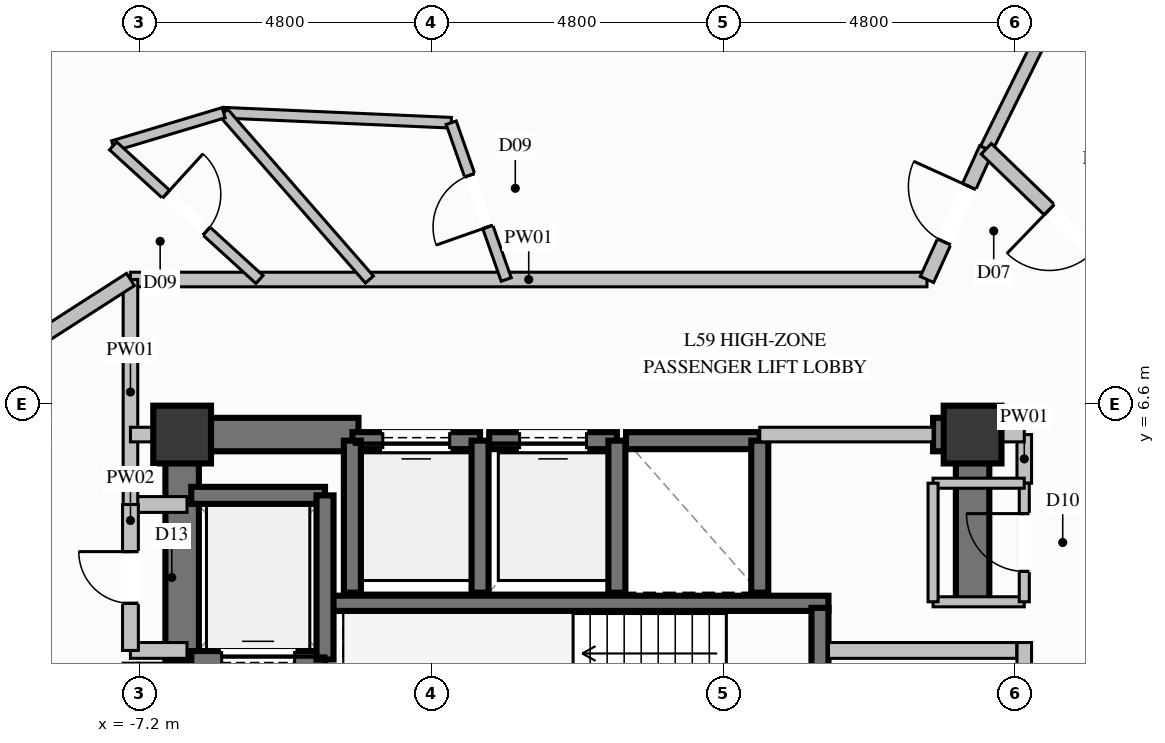
"""IFC4 building model, lengths in metres.
Left out: names, types, materials, properties, quantities, classifications, styles, units other than length and angle.
Written with IfcOpenShell. Run it as: python <this file> out.ifc"""

import sys

from ifc_helpers import new_model, si_unit, direction, frame, frame_2d, origin, origin_2d, place, context, subcontext, project, spatial, rectangle, extrude, element, fill, save


model = new_model("IFC4")
c1 = context("Model", 3, precision=1e-05, world=origin(), true_north=direction((0.0, 1.0)))
c2 = subcontext(c1, "Body", "Model", "MODEL_VIEW")
j1 = project(units=[si_unit("LENGTHUNIT", "METRE"), si_unit("PLANEANGLEUNIT", "RADIAN")], contexts=[c1])
p1 = place(None, origin())
s1 = spatial("IfcSite", under=j1, at=p1, CompositionType="ELEMENT")
p2 = place(p1, origin())
s2 = spatial("IfcBuilding", under=s1, at=p2, CompositionType="ELEMENT")
p3 = place(p2, frame((0.0, 0.0, 227.2)))
s3 = spatial("IfcBuildingStorey", under=s2, at=p3, CompositionType="ELEMENT", Elevation=227.2)
for number, where, z_axis, x_axis in (
    (1, (6.5, 6.1, 0.0), (0.0, 0.0, 1.0), (1.0, 0.0, 0.0)),
    (2, (-6.5, 6.1, 0.0), (0.0, 0.0, 1.0), (1.0, 0.0, 0.0)),
):
    element("IfcColumn", number, at=place(p3, frame(where, z_axis=z_axis, x_axis=x_axis)), inside=s3, PredefinedType="COLUMN", context=c2, shape_type="SweptSolid", body=[
        extrude(rectangle(XDim=0.95, YDim=0.95, at=origin_2d()), origin(), (0.0, 0.0, 1.0), 3.6),
    ])
p4 = place(p3, frame((-4.13, 3.325, 0.0), z_axis=(0.0, 0.0, 1.0), x_axis=(1.0, 0.0, 0.0)))
e3 = element("IfcWall", 3, at=p4, inside=s3, PredefinedType="SOLIDWALL", context=c2, shape_type="SweptSolid", body=[
    extrude(rectangle(XDim=8.26, YDim=0.25, at=frame_2d((4.13, 0.0))), origin(), (0.0, 0.0, 1.0), 3.6),
])
p5 = place(p3, frame((-6.225, 6.1, 0.0), z_axis=(0.0, 0.0, 1.0), x_axis=(1.0, 0.0, 0.0)))
e4 = element("IfcWall", 4, at=p5, inside=s3, PredefinedType="SHEAR", context=c2, shape_type="SweptSolid", body=[
    extrude(rectangle(XDim=2.625, YDim=0.55, at=frame_2d((1.312, 0.0))), origin(), (0.0, 0.0, 1.0), 3.6),
])
p6 = place(p3, frame((5.85, 6.1, 0.0), z_axis=(0.0, 0.0, 1.0), x_axis=(1.0, 0.0, 0.0)))
e5 = element("IfcWall", 5, at=p6, inside=s3, PredefinedType="SHEAR", context=c2, shape_type="SweptSolid", body=[
    extrude(rectangle(XDim=0.375, YDim=0.55, at=frame_2d((0.188, 0.0))), origin(), (0.0, 0.0, 1.0), 3.6),
])
p7 = place(p3, frame((-6.5, 2.35, 0.0), z_axis=(0.0, 0.0, 1.0), x_axis=(0.0, 1.0, 0.0)))
e6 = element("IfcWall", 6, at=p7, inside=s3, PredefinedType="SHEAR", context=c2, shape_type="SweptSolid", body=[
    extrude(rectangle(XDim=4.025, YDim=0.55, at=frame_2d((2.012, 0.0))), origin(), (0.0, 0.0, 1.0), 3.6),
])
p8 = place(p3, frame((6.5, 3.35, 0.0), z_axis=(0.0, 0.0, 1.0), x_axis=(0.0, 1.0, 0.0)))
e7 = element("IfcWall", 7, at=p8, inside=s3, PredefinedType="SHEAR", context=c2, shape_type="SweptSolid", body=[
    extrude(rectangle(XDim=3.025, YDim=0.55, at=frame_2d((1.512, 0.0))), origin(), (0.0, 0.0, 1.0), 3.6),
])
p9 = place(p3, frame((-1.6, 6.0, 0.0), z_axis=(0.0, 0.0, 1.0), x_axis=(-1.0, 0.0, 0.0)))
e8 = element("IfcWall", 8, at=p9, inside=s3, PredefinedType="SOLIDWALL", context=c2, shape_type="SweptSolid", body=[
    extrude(rectangle(XDim=2.1, YDim=0.28, at=frame_2d((1.05, 0.0))), origin(), (0.0, 0.0, 1.0), 3.36),
])
p10 = place(p9, frame((0.5, 0.0, 0.0)))
e9 = element("IfcOpeningElement", 9, at=p10, cuts=e8, PredefinedType="OPENING", context=c2, shape_type="SweptSolid", body=[
    extrude(rectangle(XDim=1.1, YDim=2.2, at=frame_2d((0.55, 1.1))), frame((0.0, 0.15, 0.0), z_axis=(0.0, -1.0, 0.0), x_axis=(1.0, 0.0, 0.0)), (0.0, 0.0, 1.0), 0.3),
])
for number, where, z_axis, x_axis in (
    (10, (-3.7, 6.0, 0.0), (0.0, 0.0, 1.0), (0.0, -1.0, 0.0)),
    (11, (-1.6, 3.5, 0.0), (0.0, 0.0, 1.0), (0.0, 1.0, 0.0)),
):
    element("IfcWall", number, at=place(p3, frame(where, z_axis=z_axis, x_axis=x_axis)), inside=s3, PredefinedType="SOLIDWALL", context=c2, shape_type="SweptSolid", body=[
        extrude(rectangle(XDim=2.5, YDim=0.28, at=frame_2d((1.25, 0.0))), origin(), (0.0, 0.0, 1.0), 3.36),
    ])
p11 = place(p3, frame((0.65, 6.0, 0.0), z_axis=(0.0, 0.0, 1.0), x_axis=(-1.0, 0.0, 0.0)))
e12 = element("IfcWall", 12, at=p11, inside=s3, PredefinedType="SOLIDWALL", context=c2, shape_type="SweptSolid", body=[
    extrude(rectangle(XDim=2.1, YDim=0.28, at=frame_2d((1.05, 0.0))), origin(), (0.0, 0.0, 1.0), 3.36),
])
p12 = place(p11, frame((0.5, 0.0, 0.0)))
e13 = element("IfcOpeningElement", 13, at=p12, cuts=e12, PredefinedType="OPENING", context=c2, shape_type="SweptSolid", body=[
    extrude(rectangle(XDim=1.1, YDim=2.2, at=frame_2d((0.55, 1.1))), frame((0.0, 0.15, 0.0), z_axis=(0.0, -1.0, 0.0), x_axis=(1.0, 0.0, 0.0)), (0.0, 0.0, 1.0), 0.3),
])
p13 = place(p3, frame((0.65, 3.5, 0.0), z_axis=(0.0, 0.0, 1.0), x_axis=(0.0, 1.0, 0.0)))
e14 = element("IfcWall", 14, at=p13, inside=s3, PredefinedType="SOLIDWALL", context=c2, shape_type="SweptSolid", body=[
    extrude(rectangle(XDim=2.5, YDim=0.28, at=frame_2d((1.25, 0.0))), origin(), (0.0, 0.0, 1.0), 3.36),
])
p14 = place(p3, frame((3.0, 6.0, 0.0), z_axis=(0.0, 0.0, 1.0), x_axis=(-1.0, 0.0, 0.0)))
e15 = element("IfcWall", 15, at=p14, inside=s3, PredefinedType="SOLIDWALL", context=c2, shape_type="SweptSolid", body=[
    extrude(rectangle(XDim=2.2, YDim=0.28, at=frame_2d((1.1, 0.0))), origin(), (0.0, 0.0, 1.0), 3.36),
])
p15 = place(p3, frame((3.0, 3.5, 0.0), z_axis=(0.0, 0.0, 1.0), x_axis=(0.0, 1.0, 0.0)))
e16 = element("IfcWall", 16, at=p15, inside=s3, PredefinedType="SOLIDWALL", context=c2, shape_type="SweptSolid", body=[
    extrude(rectangle(XDim=2.5, YDim=0.28, at=frame_2d((1.25, 0.0))), origin(), (0.0, 0.0, 1.0), 3.36),
])
p16 = place(p3, frame((-6.35, 2.4, 0.0), z_axis=(0.0, 0.0, 1.0), x_axis=(1.0, 0.0, 0.0)))
e17 = element("IfcWall", 17, at=p16, inside=s3, PredefinedType="SOLIDWALL", context=c2, shape_type="SweptSolid", body=[
    extrude(rectangle(XDim=2.2, YDim=0.28, at=frame_2d((1.1, 0.0))), origin(), (0.0, 0.0, 1.0), 3.36),
])
p17 = place(p16, frame((0.5, 0.0, 0.0)))
e18 = element("IfcOpeningElement", 18, at=p17, cuts=e17, PredefinedType="OPENING", context=c2, shape_type="SweptSolid", body=[
    extrude(rectangle(XDim=1.2, YDim=2.2, at=frame_2d((0.6, 1.1))), frame((0.0, 0.15, 0.0), z_axis=(0.0, -1.0, 0.0), x_axis=(1.0, 0.0, 0.0)), (0.0, 0.0, 1.0), 0.3),
])
p18 = place(p3, frame((-4.15, 5.1, 0.0), z_axis=(0.0, 0.0, 1.0), x_axis=(-1.0, 0.0, 0.0)))
e19 = element("IfcWall", 19, at=p18, inside=s3, PredefinedType="SOLIDWALL", context=c2, shape_type="SweptSolid", body=[
    extrude(rectangle(XDim=2.2, YDim=0.28, at=frame_2d((1.1, 0.0))), origin(), (0.0, 0.0, 1.0), 3.36),
])
p19 = place(p3, frame((-4.15, 2.4, 0.0), z_axis=(0.0, 0.0, 1.0), x_axis=(0.0, 1.0, 0.0)))
e20 = element("IfcWall", 20, at=p19, inside=s3, PredefinedType="SOLIDWALL", context=c2, shape_type="SweptSolid", body=[
    extrude(rectangle(XDim=2.7, YDim=0.28, at=frame_2d((1.35, 0.0))), origin(), (0.0, 0.0, 1.0), 3.36),
])
p20 = place(p3, frame((3.99, -2.21, 0.0), z_axis=(0.0, 0.0, 1.0), x_axis=(0.0, 1.0, 0.0)))
e21 = element("IfcWall", 21, at=p20, inside=s3, PredefinedType="SOLIDWALL", context=c2, shape_type="SweptSolid", body=[
    extrude(rectangle(XDim=5.46, YDim=0.28, at=frame_2d((2.73, 0.0))), origin(), (0.0, 0.0, 1.0), 3.36),
])
p21 = place(p20, frame((3.323, 0.0, 0.0)))
e22 = element("IfcOpeningElement", 22, at=p21, cuts=e21, PredefinedType="OPENING", context=c2, shape_type="SweptSolid", body=[
    extrude(rectangle(XDim=1.2, YDim=2.2, at=frame_2d((0.6, 1.1))), frame((0.0, 0.15, 0.0), z_axis=(0.0, -1.0, 0.0), x_axis=(1.0, 0.0, 0.0)), (0.0, 0.0, 1.0), 0.3),
])
p22 = place(p3, frame((7.35, -2.34, 0.0), z_axis=(0.0, 0.0, 1.0), x_axis=(0.0, 1.0, 0.0)))
e23 = element("IfcWall", 23, at=p22, inside=s3, PredefinedType="PARTITIONING", context=c2, shape_type="SweptSolid", body=[
    extrude(rectangle(XDim=5.02, YDim=0.24, at=frame_2d((2.51, 0.0))), origin(), (0.0, 0.0, 1.0), 2.445),
])
p23 = place(p22, frame((2.515, 0.0, 0.0)))
e24 = element("IfcOpeningElement", 24, at=p23, cuts=e23, PredefinedType="OPENING", context=c2, shape_type="SweptSolid", body=[
    extrude(rectangle(XDim=1.15, YDim=2.2, at=frame_2d((0.575, 1.1))), frame((0.0, 0.13, 0.0), z_axis=(0.0, -1.0, 0.0), x_axis=(1.0, 0.0, 0.0)), (0.0, 0.0, 1.0), 0.26),
])
p24 = place(p3, frame((4.13, 2.55, 0.0), z_axis=(0.0, 0.0, 1.0), x_axis=(1.0, 0.0, 0.0)))
e25 = element("IfcWall", 25, at=p24, inside=s3, PredefinedType="PARTITIONING", context=c2, shape_type="SweptSolid", body=[
    extrude(rectangle(XDim=3.095, YDim=0.26, at=frame_2d((1.548, 0.0))), origin(), (0.0, 0.0, 1.0), 3.36),
])
for number, where, z_axis, x_axis in (
    (26, (-7.35, 4.95, 0.0), (0.0, 0.0, 1.0), (1.0, 0.0, 0.0)),
    (27, (-7.35, 2.55, 0.0), (0.0, 0.0, 1.0), (1.0, 0.0, 0.0)),
):
    element("IfcWall", number, at=place(p3, frame(where, z_axis=z_axis, x_axis=x_axis)), inside=s3, PredefinedType="PARTITIONING", context=c2, shape_type="SweptSolid", body=[
        extrude(rectangle(XDim=0.93, YDim=0.26, at=frame_2d((0.465, 0.0))), origin(), (0.0, 0.0, 1.0), 3.36),
    ])
p25 = place(p3, frame((-7.35, 2.55, 0.0), z_axis=(0.0, 0.0, 1.0), x_axis=(0.0, 1.0, 0.0)))
e28 = element("IfcWall", 28, at=p25, inside=s3, PredefinedType="PARTITIONING", context=c2, shape_type="SweptSolid", body=[
    extrude(rectangle(XDim=2.4, YDim=0.26, at=frame_2d((1.2, 0.0))), origin(), (0.0, 0.0, 1.0), 2.445),
])
p26 = place(p25, frame((0.775, 0.0, 0.0)))
e29 = element("IfcOpeningElement", 29, at=p26, cuts=e28, PredefinedType="OPENING", context=c2, shape_type="SweptSolid", body=[
    extrude(rectangle(XDim=0.85, YDim=2.05, at=frame_2d((0.425, 1.025))), frame((0.0, 0.14, 0.0), z_axis=(0.0, -1.0, 0.0), x_axis=(1.0, 0.0, 0.0)), (0.0, 0.0, 1.0), 0.28),
])
p27 = place(p3, frame((-7.35, 8.65, 0.0), z_axis=(0.0, 0.0, 1.0), x_axis=(1.0, 0.0, 0.0)))
e30 = element("IfcWall", 30, at=p27, inside=s3, PredefinedType="PARTITIONING", context=c2, shape_type="SweptSolid", body=[
    extrude(rectangle(XDim=13.1, YDim=0.24, at=frame_2d((6.55, 0.0))), origin(), (0.0, 0.0, 1.0), 3.36),
])
p28 = place(p3, frame((3.0, 6.1, 0.0), z_axis=(0.0, 0.0, 1.0), x_axis=(1.0, 0.0, 0.0)))
e31 = element("IfcWall", 31, at=p28, inside=s3, PredefinedType="PARTITIONING", context=c2, shape_type="SweptSolid", body=[
    extrude(rectangle(XDim=2.85, YDim=0.24, at=frame_2d((1.425, 0.0))), origin(), (0.0, 0.0, 1.0), 2.445),
])
p29 = place(p3, frame((7.35, 5.3, 0.0), z_axis=(0.0, 0.0, 1.0), x_axis=(0.0, 1.0, 0.0)))
e32 = element("IfcWall", 32, at=p29, inside=s3, PredefinedType="PARTITIONING", context=c2, shape_type="SweptSolid", body=[
    extrude(rectangle(XDim=0.8, YDim=0.24, at=frame_2d((0.4, 0.0))), origin(), (0.0, 0.0, 1.0), 2.445),
])
p30 = place(p3, frame((6.5, 6.1, 0.0), z_axis=(0.0, 0.0, 1.0), x_axis=(1.0, 0.0, 0.0)))
e33 = element("IfcWall", 33, at=p30, inside=s3, PredefinedType="PARTITIONING", context=c2, shape_type="SweptSolid", body=[
    extrude(rectangle(XDim=0.85, YDim=0.24, at=frame_2d((0.425, 0.0))), origin(), (0.0, 0.0, 1.0), 2.876),
])
p31 = place(p3, frame((-7.35, 4.95, 0.0), z_axis=(0.0, 0.0, 1.0), x_axis=(0.0, 1.0, 0.0)))
e34 = element("IfcWall", 34, at=p31, inside=s3, PredefinedType="PARTITIONING", context=c2, shape_type="SweptSolid", body=[
    extrude(rectangle(XDim=3.7, YDim=0.24, at=frame_2d((1.85, 0.0))), origin(), (0.0, 0.0, 1.0), 2.445),
])
p32 = place(p3, frame((-7.35, 6.1, 0.0), z_axis=(0.0, 0.0, 1.0), x_axis=(1.0, 0.0, 0.0)))
e35 = element("IfcWall", 35, at=p32, inside=s3, PredefinedType="PARTITIONING", context=c2, shape_type="SweptSolid", body=[
    extrude(rectangle(XDim=0.85, YDim=0.24, at=frame_2d((0.425, 0.0))), origin(), (0.0, 0.0, 1.0), 2.876),
])
p33 = place(p3, frame((5.85, 3.35, 0.0), z_axis=(0.0, 0.0, 1.0), x_axis=(1.0, 0.0, 0.0)))
e36 = element("IfcWall", 36, at=p33, inside=s3, PredefinedType="PARTITIONING", context=c2, shape_type="SweptSolid", body=[
    extrude(rectangle(XDim=1.5, YDim=0.165, at=frame_2d((0.75, 0.0))), origin(), (0.0, 0.0, 1.0), 3.36),
])
p34 = place(p3, frame((7.35, 3.35, 0.0), z_axis=(0.0, 0.0, 1.0), x_axis=(0.0, 1.0, 0.0)))
e37 = element("IfcWall", 37, at=p34, inside=s3, PredefinedType="PARTITIONING", context=c2, shape_type="SweptSolid", body=[
    extrude(rectangle(XDim=1.95, YDim=0.165, at=frame_2d((0.975, 0.0))), origin(), (0.0, 0.0, 1.0), 3.36),
])
p35 = place(p34, frame((0.5, 0.0, 0.0)))
e38 = element("IfcOpeningElement", 38, at=p35, cuts=e37, PredefinedType="OPENING", context=c2, shape_type="SweptSolid", body=[
    extrude(rectangle(XDim=0.95, YDim=2.1, at=frame_2d((0.475, 1.05))), frame((0.0, 0.093, 0.0), z_axis=(0.0, -1.0, 0.0), x_axis=(1.0, 0.0, 0.0)), (0.0, 0.0, 1.0), 0.185),
])
p36 = place(p3, frame((7.35, 5.3, 0.0), z_axis=(0.0, 0.0, 1.0), x_axis=(-1.0, 0.0, 0.0)))
e39 = element("IfcWall", 39, at=p36, inside=s3, PredefinedType="PARTITIONING", context=c2, shape_type="SweptSolid", body=[
    extrude(rectangle(XDim=1.5, YDim=0.165, at=frame_2d((0.75, 0.0))), origin(), (0.0, 0.0, 1.0), 2.445),
])
p37 = place(p3, frame((5.85, 5.3, 0.0), z_axis=(0.0, 0.0, 1.0), x_axis=(0.0, -1.0, 0.0)))
e40 = element("IfcWall", 40, at=p37, inside=s3, PredefinedType="PARTITIONING", context=c2, shape_type="SweptSolid", body=[
    extrude(rectangle(XDim=1.95, YDim=0.165, at=frame_2d((0.975, 0.0))), origin(), (0.0, 0.0, 1.0), 2.445),
])
p38 = place(p3, frame((6.725, 10.799, 0.0), z_axis=(0.0, 0.0, 1.0), x_axis=(0.443620421332, 0.896214774358, 0.0)))
e41 = element("IfcWall", 41, at=p38, inside=s3, PredefinedType="PARTITIONING", context=c2, shape_type="SweptSolid", body=[
    extrude(rectangle(XDim=2.693, YDim=0.21, at=frame_2d((1.347, 0.0))), origin(), (0.0, 0.0, 1.0), 2.876),
])
p39 = place(p3, frame((-5.817, 11.393, 0.0), z_axis=(0.0, 0.0, 1.0), x_axis=(0.999028783545, -0.044062338206, 0.0)))
e42 = element("IfcWall", 42, at=p39, inside=s3, PredefinedType="PLUMBINGWALL", context=c2, shape_type="SweptSolid", body=[
    extrude(rectangle(XDim=3.746, YDim=0.175, at=frame_2d((1.873, 0.0))), origin(), (0.0, 0.0, 1.0), 3.36),
])
p40 = place(p3, frame((-5.817, 11.393, 0.0), z_axis=(0.0, 0.0, 1.0), x_axis=(0.657992027161, -0.753024894803, 0.0)))
e43 = element("IfcWall", 43, at=p40, inside=s3, PredefinedType="PLUMBINGWALL", context=c2, shape_type="SweptSolid", body=[
    extrude(rectangle(XDim=3.643, YDim=0.175, at=frame_2d((1.821, 0.0))), origin(), (0.0, 0.0, 1.0), 3.36),
])
p41 = place(p3, frame((-1.17, 8.65, 0.0), z_axis=(0.0, 0.0, 1.0), x_axis=(-0.331225887152, 0.943551488622, 0.0)))
e44 = element("IfcWall", 44, at=p41, inside=s3, PredefinedType="PLUMBINGWALL", context=c2, shape_type="SweptSolid", body=[
    extrude(rectangle(XDim=2.732, YDim=0.175, at=frame_2d((1.366, 0.0))), origin(), (0.0, 0.0, 1.0), 3.36),
])
p42 = place(p41, frame((0.916, 0.0, 0.0)))
e45 = element("IfcOpeningElement", 45, at=p42, cuts=e44, PredefinedType="OPENING", context=c2, shape_type="SweptSolid", body=[
    extrude(rectangle(XDim=0.9, YDim=2.1, at=frame_2d((0.45, 1.05))), frame((0.0, 0.098, 0.0), z_axis=(0.0, -1.0, 0.0), x_axis=(1.0, 0.0, 0.0)), (0.0, 0.0, 1.0), 0.195),
])
p43 = place(p3, frame((5.75, 8.65, 0.0), z_axis=(0.0, 0.0, 1.0), x_axis=(0.413171528251, 0.910653220629, 0.0)))
e46 = element("IfcWall", 46, at=p43, inside=s3, PredefinedType="PARTITIONING", context=c2, shape_type="SweptSolid", body=[
    extrude(rectangle(XDim=2.36, YDim=0.24, at=frame_2d((1.18, 0.0))), origin(), (0.0, 0.0, 1.0), 2.876),
])
p44 = place(p43, frame((0.68, 0.0, 0.0)))
e47 = element("IfcOpeningElement", 47, at=p44, cuts=e46, PredefinedType="OPENING", context=c2, shape_type="SweptSolid", body=[
    extrude(rectangle(XDim=1.0, YDim=2.2, at=frame_2d((0.5, 1.1))), frame((0.0, 0.13, 0.0), z_axis=(0.0, -1.0, 0.0), x_axis=(1.0, 0.0, 0.0)), (0.0, 0.0, 1.0), 0.26),
])
p45 = place(p3, frame((-7.635, 10.847, 0.0), z_axis=(0.0, 0.0, 1.0), x_axis=(0.95772357585, 0.287690028089, 0.0)))
e48 = element("IfcWall", 48, at=p45, inside=s3, PredefinedType="PLUMBINGWALL", context=c2, shape_type="SweptSolid", body=[
    extrude(rectangle(XDim=1.898, YDim=0.175, at=frame_2d((0.949, 0.0))), origin(), (0.0, 0.0, 1.0), 3.36),
])
p46 = place(p3, frame((-7.635, 10.847, 0.0), z_axis=(0.0, 0.0, 1.0), x_axis=(0.738586041598, -0.674159223891, 0.0)))
e49 = element("IfcWall", 49, at=p46, inside=s3, PredefinedType="PLUMBINGWALL", context=c2, shape_type="SweptSolid", body=[
    extrude(rectangle(XDim=3.259, YDim=0.175, at=frame_2d((1.629, 0.0))), origin(), (0.0, 0.0, 1.0), 3.36),
])
p47 = place(p46, frame((1.179, 0.0, 0.0)))
e50 = element("IfcOpeningElement", 50, at=p47, cuts=e49, PredefinedType="OPENING", context=c2, shape_type="SweptSolid", body=[
    extrude(rectangle(XDim=0.9, YDim=2.1, at=frame_2d((0.45, 1.05))), frame((0.0, 0.098, 0.0), z_axis=(0.0, -1.0, 0.0), x_axis=(1.0, 0.0, 0.0)), (0.0, 0.0, 1.0), 0.195),
])
p48 = place(p3, frame((-11.238, 6.15, 0.0), z_axis=(0.0, 0.0, 1.0), x_axis=(0.841118406986, 0.540851019625, 0.0)))
e51 = element("IfcWall", 51, at=p48, inside=s3, PredefinedType="PARTITIONING", context=c2, shape_type="SweptSolid", body=[
    extrude(rectangle(XDim=4.622, YDim=0.24, at=frame_2d((2.311, 0.0))), origin(), (0.0, 0.0, 1.0), 3.36),
])
p49 = place(p48, frame((1.811, 0.0, 0.0)))
e52 = element("IfcOpeningElement", 52, at=p49, cuts=e51, PredefinedType="OPENING", context=c2, shape_type="SweptSolid", body=[
    extrude(rectangle(XDim=1.0, YDim=2.2, at=frame_2d((0.5, 1.1))), frame((0.0, 0.13, 0.0), z_axis=(0.0, -1.0, 0.0), x_axis=(1.0, 0.0, 0.0)), (0.0, 0.0, 1.0), 0.26),
])
p50 = place(p3, frame((9.517, 8.103, 0.0), z_axis=(0.0, 0.0, 1.0), x_axis=(-0.719359188441, 0.694638292931, 0.0)))
e53 = element("IfcWall", 53, at=p50, inside=s3, PredefinedType="PARTITIONING", context=c2, shape_type="SweptSolid", body=[
    extrude(rectangle(XDim=3.881, YDim=0.24, at=frame_2d((1.94, 0.0))), origin(), (0.0, 0.0, 1.0), 3.36),
])
p51 = place(p50, frame((1.441, 0.0, 0.0)))
e54 = element("IfcOpeningElement", 54, at=p51, cuts=e53, PredefinedType="OPENING", context=c2, shape_type="SweptSolid", body=[
    extrude(rectangle(XDim=1.0, YDim=2.2, at=frame_2d((0.5, 1.1))), frame((0.0, 0.13, 0.0), z_axis=(0.0, -1.0, 0.0), x_axis=(1.0, 0.0, 0.0)), (0.0, 0.0, 1.0), 0.26),
])
p52 = place(p10, origin())
e55 = element("IfcDoor", 55, at=p52, inside=s3, OperationType="SLIDING_TO_LEFT", PredefinedType="DOOR", context=c2, shape_type="SweptSolid", body=[
    extrude(rectangle(XDim=1.1, YDim=2.2, at=frame_2d((0.55, 1.1))), frame((0.0, 0.025, 0.0), z_axis=(0.0, -1.0, 0.0), x_axis=(1.0, 0.0, 0.0)), (0.0, 0.0, 1.0), 0.05),
])
fill(e9, e55)
p53 = place(p12, origin())
e56 = element("IfcDoor", 56, at=p53, inside=s3, OperationType="SLIDING_TO_LEFT", PredefinedType="DOOR", context=c2, shape_type="SweptSolid", body=[
    extrude(rectangle(XDim=1.1, YDim=2.2, at=frame_2d((0.55, 1.1))), frame((0.0, 0.025, 0.0), z_axis=(0.0, -1.0, 0.0), x_axis=(1.0, 0.0, 0.0)), (0.0, 0.0, 1.0), 0.05),
])
fill(e13, e56)
p54 = place(p17, origin())
e57 = element("IfcDoor", 57, at=p54, inside=s3, OperationType="SLIDING_TO_LEFT", PredefinedType="DOOR", context=c2, shape_type="SweptSolid", body=[
    extrude(rectangle(XDim=1.2, YDim=2.2, at=frame_2d((0.6, 1.1))), frame((0.0, 0.025, 0.0), z_axis=(0.0, -1.0, 0.0), x_axis=(1.0, 0.0, 0.0)), (0.0, 0.0, 1.0), 0.05),
])
fill(e18, e57)
p55 = place(p26, origin())
e58 = element("IfcDoor", 58, at=p55, inside=s3, OperationType="SINGLE_SWING_RIGHT", PredefinedType="DOOR", context=c2, shape_type="SweptSolid", body=[
    extrude(rectangle(XDim=0.85, YDim=2.05, at=frame_2d((0.425, 1.025))), frame((0.0, 0.025, 0.0), z_axis=(0.0, -1.0, 0.0), x_axis=(1.0, 0.0, 0.0)), (0.0, 0.0, 1.0), 0.05),
])
fill(e29, e58)
p56 = place(p35, origin())
e59 = element("IfcDoor", 59, at=p56, inside=s3, OperationType="SINGLE_SWING_RIGHT", PredefinedType="DOOR", context=c2, shape_type="SweptSolid", body=[
    extrude(rectangle(XDim=0.95, YDim=2.1, at=frame_2d((0.475, 1.05))), frame((0.0, 0.025, 0.0), z_axis=(0.0, -1.0, 0.0), x_axis=(1.0, 0.0, 0.0)), (0.0, 0.0, 1.0), 0.05),
])
fill(e38, e59)
p57 = place(p42, origin())
e60 = element("IfcDoor", 60, at=p57, inside=s3, OperationType="SINGLE_SWING_LEFT", PredefinedType="DOOR", context=c2, shape_type="SweptSolid", body=[
    extrude(rectangle(XDim=0.9, YDim=2.1, at=frame_2d((0.45, 1.05))), frame((0.0, 0.025, 0.0), z_axis=(0.0, -1.0, 0.0), x_axis=(1.0, 0.0, 0.0)), (0.0, 0.0, 1.0), 0.05),
])
fill(e45, e60)
p58 = place(p44, origin())
e61 = element("IfcDoor", 61, at=p58, inside=s3, OperationType="SINGLE_SWING_RIGHT", PredefinedType="DOOR", context=c2, shape_type="SweptSolid", body=[
    extrude(rectangle(XDim=1.0, YDim=2.2, at=frame_2d((0.5, 1.1))), frame((0.0, 0.025, 0.0), z_axis=(0.0, -1.0, 0.0), x_axis=(1.0, 0.0, 0.0)), (0.0, 0.0, 1.0), 0.05),
])
fill(e47, e61)
p59 = place(p47, origin())
e62 = element("IfcDoor", 62, at=p59, inside=s3, OperationType="SINGLE_SWING_LEFT", PredefinedType="DOOR", context=c2, shape_type="SweptSolid", body=[
    extrude(rectangle(XDim=0.9, YDim=2.1, at=frame_2d((0.45, 1.05))), frame((0.0, 0.025, 0.0), z_axis=(0.0, -1.0, 0.0), x_axis=(1.0, 0.0, 0.0)), (0.0, 0.0, 1.0), 0.05),
])
fill(e50, e62)
p60 = place(p51, origin())
e63 = element("IfcDoor", 63, at=p60, inside=s3, OperationType="SINGLE_SWING_RIGHT", PredefinedType="DOOR", context=c2, shape_type="SweptSolid", body=[
    extrude(rectangle(XDim=1.0, YDim=2.2, at=frame_2d((0.5, 1.1))), frame((0.0, 0.025, 0.0), z_axis=(0.0, -1.0, 0.0), x_axis=(1.0, 0.0, 0.0)), (0.0, 0.0, 1.0), 0.05),
])
fill(e54, e63)
save(model, sys.argv[1])
